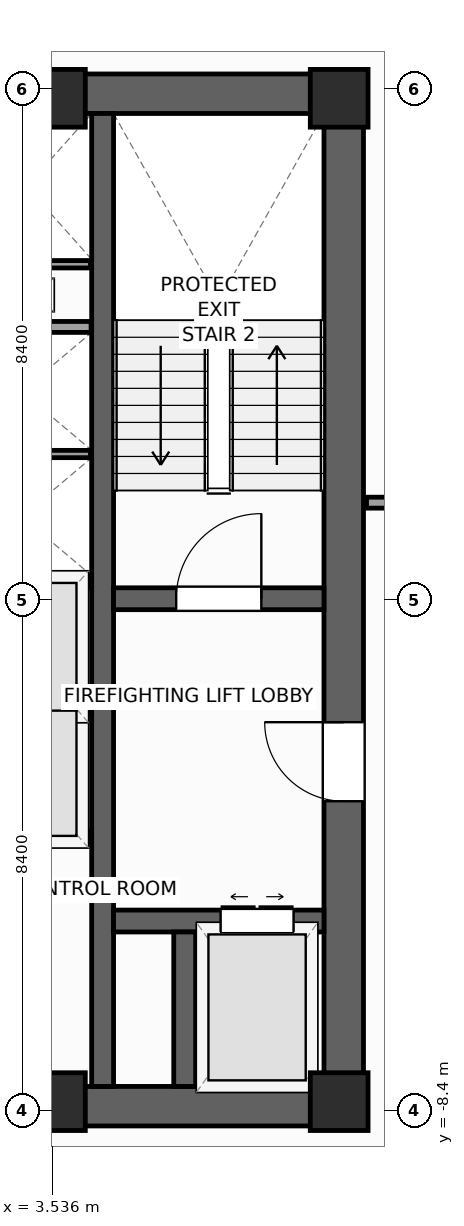
"""IFC4 building model, lengths in metres.
Left out: names, types, materials, properties, quantities, classifications, styles, units other than length and angle.
Written with IfcOpenShell. Run it as: python <this file> out.ifc"""

import sys

from ifc_helpers import new_model, si_unit, direction, frame, frame_2d, origin, origin_2d, place, context, subcontext, project, spatial, rectangle, extrude, source, transform, mapped, element, fill, save


model = new_model("IFC4")
c1 = context("Model", 3, precision=1e-05, world=origin(), true_north=direction((0.0, 1.0)))
c2 = subcontext(c1, "Body", "Model", "MODEL_VIEW")
j1 = project(units=[si_unit("LENGTHUNIT", "METRE"), si_unit("PLANEANGLEUNIT", "RADIAN")], contexts=[c1])
p1 = place(None, origin())
s1 = spatial("IfcSite", under=j1, at=p1, CompositionType="ELEMENT")
p2 = place(p1, origin())
s2 = spatial("IfcBuilding", under=s1, at=p2, CompositionType="ELEMENT")
p3 = place(p2, frame((0.0, 0.0, 184.4)))
s3 = spatial("IfcBuildingStorey", under=s2, at=p3, CompositionType="ELEMENT", Elevation=184.4)
p4 = place(p3, frame((-8.65, -8.325, 0.0), z_axis=(0.0, 0.0, 1.0), x_axis=(1.0, 0.0, 0.0)))
e1 = element("IfcWall", 1, at=p4, inside=s3, PredefinedType="SHEAR", context=c2, shape_type="SweptSolid", body=[
    extrude(rectangle(XDim=17.3, YDim=0.65, at=frame_2d((8.65, 0.0))), origin(), (0.0, 0.0, 1.0), 4.0),
])
p5 = place(p4, frame((8.0, 0.0, 0.0)))
e2 = element("IfcOpeningElement", 2, at=p5, cuts=e1, PredefinedType="OPENING", context=c2, shape_type="SweptSolid", body=[
    extrude(rectangle(XDim=1.3, YDim=2.2, at=frame_2d((0.65, 1.1))), frame((0.0, 0.335, 0.0), z_axis=(0.0, -1.0, 0.0), x_axis=(1.0, 0.0, 0.0)), (0.0, 0.0, 1.0), 0.67),
])
p6 = place(p3, frame((-8.65, 8.325, 0.0), z_axis=(0.0, 0.0, 1.0), x_axis=(1.0, 0.0, 0.0)))
e3 = element("IfcWall", 3, at=p6, inside=s3, PredefinedType="SHEAR", context=c2, shape_type="SweptSolid", body=[
    extrude(rectangle(XDim=17.3, YDim=0.65, at=frame_2d((8.65, 0.0))), origin(), (0.0, 0.0, 1.0), 4.0),
])
p7 = place(p3, frame((8.325, -8.0, 0.0), z_axis=(0.0, 0.0, 1.0), x_axis=(0.0, 1.0, 0.0)))
e4 = element("IfcWall", 4, at=p7, inside=s3, PredefinedType="SHEAR", context=c2, shape_type="SweptSolid", body=[
    extrude(rectangle(XDim=16.0, YDim=0.65, at=frame_2d((8.0, 0.0))), origin(), (0.0, 0.0, 1.0), 4.0),
])
p8 = place(p7, frame((4.69, 0.0, 0.0)))
e5 = element("IfcOpeningElement", 5, at=p8, cuts=e4, PredefinedType="OPENING", context=c2, shape_type="SweptSolid", body=[
    extrude(rectangle(XDim=1.3, YDim=2.2, at=frame_2d((0.65, 1.1))), frame((0.0, 0.335, 0.0), z_axis=(0.0, -1.0, 0.0), x_axis=(1.0, 0.0, 0.0)), (0.0, 0.0, 1.0), 0.67),
])
p9 = place(p3, frame((4.36, -8.0, 0.0), z_axis=(0.0, 0.0, 1.0), x_axis=(0.0, 1.0, 0.0)))
e6 = element("IfcWall", 6, at=p9, inside=s3, PredefinedType="SHEAR", context=c2, shape_type="SweptSolid", body=[
    extrude(rectangle(XDim=16.0, YDim=0.36, at=frame_2d((8.0, 0.0))), origin(), (0.0, 0.0, 1.0), 4.0),
])
p10 = place(p3, frame((4.54, 0.02, 0.0), z_axis=(0.0, 0.0, 1.0), x_axis=(1.0, 0.0, 0.0)))
e7 = element("IfcWall", 7, at=p10, inside=s3, PredefinedType="SHEAR", context=c2, shape_type="SweptSolid", body=[
    extrude(rectangle(XDim=3.46, YDim=0.36, at=frame_2d((1.73, 0.0))), origin(), (0.0, 0.0, 1.0), 4.0),
])
p11 = place(p10, frame((1.03, 0.0, 0.0)))
e8 = element("IfcOpeningElement", 8, at=p11, cuts=e7, PredefinedType="OPENING", context=c2, shape_type="SweptSolid", body=[
    extrude(rectangle(XDim=1.4, YDim=2.2, at=frame_2d((0.7, 1.1))), frame((0.0, 0.19, 0.0), z_axis=(0.0, -1.0, 0.0), x_axis=(1.0, 0.0, 0.0)), (0.0, 0.0, 1.0), 0.38),
])
p12 = place(p3, frame((4.54, -5.28, 0.0), z_axis=(0.0, 0.0, 1.0), x_axis=(1.0, 0.0, 0.0)))
e9 = element("IfcWall", 9, at=p12, inside=s3, PredefinedType="SHEAR", context=c2, shape_type="SweptSolid", body=[
    extrude(rectangle(XDim=3.46, YDim=0.36, at=frame_2d((1.73, 0.0))), origin(), (0.0, 0.0, 1.0), 4.0),
])
p13 = place(p12, frame((1.76, 0.0, 0.0)))
e10 = element("IfcOpeningElement", 10, at=p13, cuts=e9, PredefinedType="OPENING", context=c2, shape_type="SweptSolid", body=[
    extrude(rectangle(XDim=1.2, YDim=2.25, at=frame_2d((0.6, 1.125))), frame((0.0, 0.19, 0.0), z_axis=(0.0, -1.0, 0.0), x_axis=(1.0, 0.0, 0.0)), (0.0, 0.0, 1.0), 0.38),
])
p14 = place(p3, frame((5.71, -8.0, 0.0), z_axis=(0.0, 0.0, 1.0), x_axis=(0.0, 1.0, 0.0)))
e11 = element("IfcWall", 11, at=p14, inside=s3, PredefinedType="SHEAR", context=c2, shape_type="SweptSolid", body=[
    extrude(rectangle(XDim=2.54, YDim=0.36, at=frame_2d((1.27, 0.0))), origin(), (0.0, 0.0, 1.0), 4.0),
])
m1 = source(origin(), c2, "Body", "SweptSolid", [
    extrude(rectangle(XDim=0.95, YDim=0.95, at=origin_2d()), origin(), (0.0, 0.0, 1.0), 4.0),
])
for number, where, z_axis, x_axis in (
    (12, (8.25, -8.25, 0.0), (0.0, 0.0, 1.0), (1.0, 0.0, 0.0)),
    (13, (8.25, 8.25, 0.0), (0.0, 0.0, 1.0), (1.0, 0.0, 0.0)),
    (14, (3.6, -8.25, 0.0), (0.0, 0.0, 1.0), (1.0, 0.0, 0.0)),
    (15, (3.6, 8.25, 0.0), (0.0, 0.0, 1.0), (1.0, 0.0, 0.0)),
):
    element("IfcColumn", number, at=place(p3, frame(where, z_axis=z_axis, x_axis=x_axis)), inside=s3, PredefinedType="PILASTER", context=c2, shape_type="MappedRepresentation", body=[
        mapped(m1, transform((0.0, 0.0, 0.0), scale=1.0)),
    ])
for number, where, z_axis, x_axis in (
    (16, (1.89, -3.9, 0.0), (0.0, 0.0, 1.0), (1.0, 0.0, 0.0)),
    (17, (1.89, 0.3, 0.0), (0.0, 0.0, 1.0), (1.0, 0.0, 0.0)),
    (18, (1.89, 4.49, 0.0), (0.0, 0.0, 1.0), (1.0, 0.0, 0.0)),
):
    element("IfcWall", number, at=place(p3, frame(where, z_axis=z_axis, x_axis=x_axis)), inside=s3, PredefinedType="PARTITIONING", context=c2, shape_type="SweptSolid", body=[
        extrude(rectangle(XDim=2.28, YDim=0.18, at=frame_2d((1.14, 0.0))), origin(), (0.0, 0.0, 1.0), 3.74),
    ])
for number, where, z_axis, x_axis in (
    (19, (1.9, -1.8, 0.0), (0.0, 0.0, 1.0), (1.0, 0.0, 0.0)),
    (20, (1.9, 2.4, 0.0), (0.0, 0.0, 1.0), (1.0, 0.0, 0.0)),
):
    element("IfcWall", number, at=place(p3, frame(where, z_axis=z_axis, x_axis=x_axis)), inside=s3, PredefinedType="PARTITIONING", context=c2, shape_type="SweptSolid", body=[
        extrude(rectangle(XDim=2.26, YDim=0.12, at=frame_2d((1.13, 0.0))), origin(), (0.0, 0.0, 1.0), 3.74),
    ])
p15 = place(p3, frame((2.06, 5.52, 0.0), z_axis=(0.0, 0.0, 1.0), x_axis=(1.0, 0.0, 0.0)))
e21 = element("IfcWall", 21, at=p15, inside=s3, PredefinedType="PARTITIONING", context=c2, shape_type="SweptSolid", body=[
    extrude(rectangle(XDim=2.1, YDim=0.12, at=frame_2d((1.05, 0.0))), origin(), (0.0, 0.0, 1.0), 3.74),
])
p16 = place(p3, frame((8.7, 1.6, 0.0), z_axis=(0.0, 0.0, 1.0), x_axis=(1.0, 0.0, 0.0)))
e22 = element("IfcWall", 22, at=p16, inside=s3, PredefinedType="PARTITIONING", context=c2, shape_type="SweptSolid", body=[
    extrude(rectangle(XDim=2.85, YDim=0.18, at=frame_2d((1.425, 0.0))), origin(), (0.0, 0.0, 1.0), 3.74),
])
p17 = place(p16, frame((0.875, 0.0, 0.0)))
e23 = element("IfcOpeningElement", 23, at=p17, cuts=e22, PredefinedType="OPENING", context=c2, shape_type="SweptSolid", body=[
    extrude(rectangle(XDim=1.1, YDim=2.2, at=frame_2d((0.55, 1.1))), frame((0.0, 0.1, 0.0), z_axis=(0.0, -1.0, 0.0), x_axis=(1.0, 0.0, 0.0)), (0.0, 0.0, 1.0), 0.2),
])
m2 = source(origin(), c2, "Body", "SweptSolid", [
    extrude(rectangle(XDim=1.4, YDim=2.2, at=frame_2d((0.7, 1.1))), frame((0.0, 0.025, 0.0), z_axis=(0.0, -1.0, 0.0), x_axis=(1.0, 0.0, 0.0)), (0.0, 0.0, 1.0), 0.05),
])
p18 = place(p11, origin())
e24 = element("IfcDoor", 24, at=p18, inside=s3, OperationType="SINGLE_SWING_RIGHT", PredefinedType="DOOR", context=c2, shape_type="MappedRepresentation", body=[
    mapped(m2, transform((0.0, 0.0, 0.0), scale=1.0)),
])
fill(e8, e24)
m3 = source(origin(), c2, "Body", "SweptSolid", [
    extrude(rectangle(XDim=1.3, YDim=2.2, at=frame_2d((0.65, 1.1))), frame((0.0, 0.025, 0.0), z_axis=(0.0, -1.0, 0.0), x_axis=(1.0, 0.0, 0.0)), (0.0, 0.0, 1.0), 0.05),
])
p19 = place(p8, origin())
e25 = element("IfcDoor", 25, at=p19, inside=s3, OperationType="SINGLE_SWING_RIGHT", PredefinedType="DOOR", context=c2, shape_type="MappedRepresentation", body=[
    mapped(m3, transform((0.0, 0.0, 0.0), scale=1.0)),
])
fill(e5, e25)
m4 = source(origin(), c2, "Body", "SweptSolid", [
    extrude(rectangle(XDim=1.2, YDim=2.25, at=frame_2d((0.6, 1.125))), frame((0.0, 0.025, 0.0), z_axis=(0.0, -1.0, 0.0), x_axis=(1.0, 0.0, 0.0)), (0.0, 0.0, 1.0), 0.05),
])
p20 = place(p13, origin())
e26 = element("IfcDoor", 26, at=p20, inside=s3, OperationType="DOUBLE_DOOR_SLIDING", PredefinedType="DOOR", context=c2, shape_type="MappedRepresentation", body=[
    mapped(m4, transform((0.0, 0.0, 0.0), scale=1.0)),
])
fill(e10, e26)
save(model, sys.argv[1])
